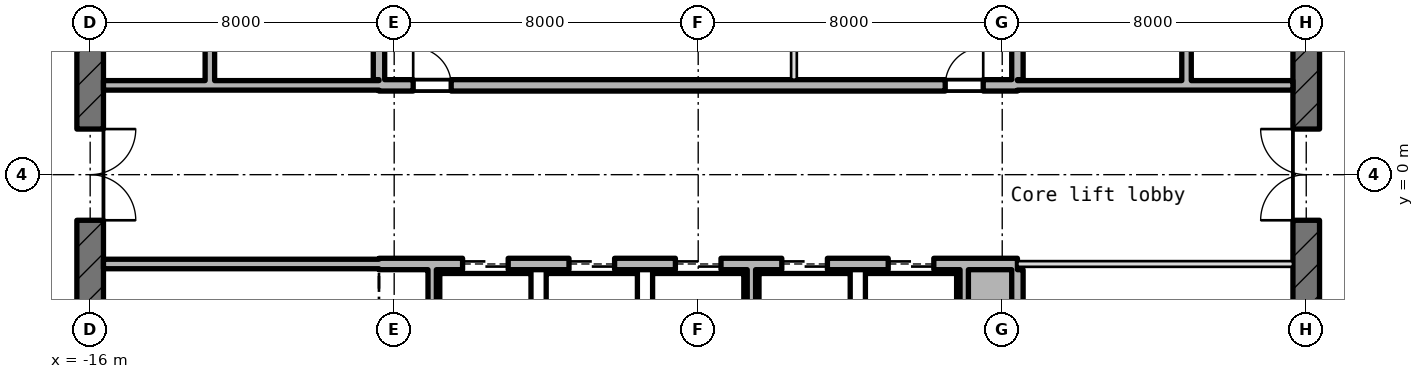
"""IFC4 building model, lengths in metres.
Left out: names, types, materials, properties, quantities, classifications, styles, units other than length and angle.
Written with IfcOpenShell. Run it as: python <this file> out.ifc"""

import sys

from ifc_helpers import new_model, si_unit, direction, frame, frame_2d, origin, place, context, subcontext, project, spatial, rectangle, extrude, element, fill, save


model = new_model("IFC4")
c1 = context("Model", 3, precision=1e-05, world=origin(), true_north=direction((0.0, 1.0)))
c2 = subcontext(c1, "Body", "Model", "MODEL_VIEW")
j1 = project(units=[si_unit("LENGTHUNIT", "METRE"), si_unit("PLANEANGLEUNIT", "RADIAN")], contexts=[c1])
p1 = place(None, origin())
s1 = spatial("IfcSite", under=j1, at=p1, CompositionType="ELEMENT")
p2 = place(p1, origin())
s2 = spatial("IfcBuilding", under=s1, at=p2, CompositionType="ELEMENT")
p3 = place(p2, frame((0.0, 0.0, 384.1)))
s3 = spatial("IfcBuildingStorey", under=s2, at=p3, CompositionType="ELEMENT", Elevation=384.1)
p4 = place(p3, frame((16.0, -10.145, -0.18), z_axis=(0.0, 0.0, 1.0), x_axis=(0.0, 1.0, 0.0)))
e1 = element("IfcWall", 1, at=p4, inside=s3, PredefinedType="SHEAR", context=c2, shape_type="SweptSolid", body=[
    extrude(rectangle(XDim=20.29, YDim=0.7, at=frame_2d((10.145, 0.0))), origin(), (0.0, 0.0, 1.0), 4.15),
])
p5 = place(p4, frame((8.945, 0.0, 0.18)))
e2 = element("IfcOpeningElement", 2, at=p5, cuts=e1, PredefinedType="OPENING", context=c2, shape_type="SweptSolid", body=[
    extrude(rectangle(XDim=2.4, YDim=2.1, at=frame_2d((1.2, 1.05))), frame((0.0, 0.36, 0.0), z_axis=(0.0, -1.0, 0.0), x_axis=(1.0, 0.0, 0.0)), (0.0, 0.0, 1.0), 0.72),
])
p6 = place(p4, frame((13.545, 0.0, 0.18)))
e3 = element("IfcOpeningElement", 3, at=p6, cuts=e1, PredefinedType="OPENING", context=c2, shape_type="SweptSolid", body=[
    extrude(rectangle(XDim=1.2, YDim=2.1, at=frame_2d((0.6, 1.05))), frame((0.0, 0.36, 0.0), z_axis=(0.0, -1.0, 0.0), x_axis=(1.0, 0.0, 0.0)), (0.0, 0.0, 1.0), 0.72),
])
p7 = place(p4, frame((2.4, 0.0, 0.18)))
e4 = element("IfcOpeningElement", 4, at=p7, cuts=e1, PredefinedType="OPENING", context=c2, shape_type="SweptSolid", body=[
    extrude(rectangle(XDim=1.2, YDim=2.1, at=frame_2d((0.6, 1.05))), frame((0.0, 0.36, 0.0), z_axis=(0.0, -1.0, 0.0), x_axis=(1.0, 0.0, 0.0)), (0.0, 0.0, 1.0), 0.72),
])
p8 = place(p3, frame((-16.0, 10.145, -0.18), z_axis=(0.0, 0.0, 1.0), x_axis=(0.0, -1.0, 0.0)))
e5 = element("IfcWall", 5, at=p8, inside=s3, PredefinedType="SHEAR", context=c2, shape_type="SweptSolid", body=[
    extrude(rectangle(XDim=20.29, YDim=0.7, at=frame_2d((10.145, 0.0))), origin(), (0.0, 0.0, 1.0), 4.15),
])
p9 = place(p8, frame((8.945, 0.0, 0.18)))
e6 = element("IfcOpeningElement", 6, at=p9, cuts=e5, PredefinedType="OPENING", context=c2, shape_type="SweptSolid", body=[
    extrude(rectangle(XDim=2.4, YDim=2.1, at=frame_2d((1.2, 1.05))), frame((0.0, 0.36, 0.0), z_axis=(0.0, -1.0, 0.0), x_axis=(1.0, 0.0, 0.0)), (0.0, 0.0, 1.0), 0.72),
])
p10 = place(p8, frame((5.545, 0.0, 0.18)))
e7 = element("IfcOpeningElement", 7, at=p10, cuts=e5, PredefinedType="OPENING", context=c2, shape_type="SweptSolid", body=[
    extrude(rectangle(XDim=1.2, YDim=2.1, at=frame_2d((0.6, 1.05))), frame((0.0, 0.36, 0.0), z_axis=(0.0, -1.0, 0.0), x_axis=(1.0, 0.0, 0.0)), (0.0, 0.0, 1.0), 0.72),
])
p11 = place(p3, frame((-15.65, -2.35, 0.0), z_axis=(0.0, 0.0, 1.0), x_axis=(1.0, 0.0, 0.0)))
e8 = element("IfcWall", 8, at=p11, inside=s3, PredefinedType="STANDARD", context=c2, shape_type="SweptSolid", body=[
    extrude(rectangle(XDim=7.25, YDim=0.25, at=frame_2d((3.625, 0.0))), origin(), (0.0, 0.0, 1.0), 3.97),
])
p12 = place(p3, frame((-8.4, -2.35, -0.18), z_axis=(0.0, 0.0, 1.0), x_axis=(1.0, 0.0, 0.0)))
e9 = element("IfcWall", 9, at=p12, inside=s3, PredefinedType="SHEAR", context=c2, shape_type="SweptSolid", body=[
    extrude(rectangle(XDim=16.8, YDim=0.3, at=frame_2d((8.4, 0.0))), origin(), (0.0, 0.0, 1.0), 4.15),
])
p13 = place(p12, frame((2.2, 0.0, 0.18)))
e10 = element("IfcOpeningElement", 10, at=p13, cuts=e9, PredefinedType="OPENING", context=c2, shape_type="SweptSolid", body=[
    extrude(rectangle(XDim=1.2, YDim=2.1, at=frame_2d((0.6, 1.05))), frame((0.0, 0.16, 0.0), z_axis=(0.0, -1.0, 0.0), x_axis=(1.0, 0.0, 0.0)), (0.0, 0.0, 1.0), 0.32),
])
p14 = place(p12, frame((5.0, 0.0, 0.18)))
e11 = element("IfcOpeningElement", 11, at=p14, cuts=e9, PredefinedType="OPENING", context=c2, shape_type="SweptSolid", body=[
    extrude(rectangle(XDim=1.2, YDim=2.1, at=frame_2d((0.6, 1.05))), frame((0.0, 0.16, 0.0), z_axis=(0.0, -1.0, 0.0), x_axis=(1.0, 0.0, 0.0)), (0.0, 0.0, 1.0), 0.32),
])
p15 = place(p12, frame((7.8, 0.0, 0.18)))
e12 = element("IfcOpeningElement", 12, at=p15, cuts=e9, PredefinedType="OPENING", context=c2, shape_type="SweptSolid", body=[
    extrude(rectangle(XDim=1.2, YDim=2.1, at=frame_2d((0.6, 1.05))), frame((0.0, 0.16, 0.0), z_axis=(0.0, -1.0, 0.0), x_axis=(1.0, 0.0, 0.0)), (0.0, 0.0, 1.0), 0.32),
])
p16 = place(p12, frame((10.6, 0.0, 0.18)))
e13 = element("IfcOpeningElement", 13, at=p16, cuts=e9, PredefinedType="OPENING", context=c2, shape_type="SweptSolid", body=[
    extrude(rectangle(XDim=1.2, YDim=2.1, at=frame_2d((0.6, 1.05))), frame((0.0, 0.16, 0.0), z_axis=(0.0, -1.0, 0.0), x_axis=(1.0, 0.0, 0.0)), (0.0, 0.0, 1.0), 0.32),
])
p17 = place(p12, frame((13.4, 0.0, 0.18)))
e14 = element("IfcOpeningElement", 14, at=p17, cuts=e9, PredefinedType="OPENING", context=c2, shape_type="SweptSolid", body=[
    extrude(rectangle(XDim=1.2, YDim=2.1, at=frame_2d((0.6, 1.05))), frame((0.0, 0.16, 0.0), z_axis=(0.0, -1.0, 0.0), x_axis=(1.0, 0.0, 0.0)), (0.0, 0.0, 1.0), 0.32),
])
p18 = place(p3, frame((8.4, -2.35, 0.0), z_axis=(0.0, 0.0, 1.0), x_axis=(1.0, 0.0, 0.0)))
e15 = element("IfcWall", 15, at=p18, inside=s3, PredefinedType="PARTITIONING", context=c2, shape_type="SweptSolid", body=[
    extrude(rectangle(XDim=7.25, YDim=0.15, at=frame_2d((3.625, 0.0))), origin(), (0.0, 0.0, 1.0), 3.97),
])
p19 = place(p3, frame((-15.65, 2.35, 0.0), z_axis=(0.0, 0.0, 1.0), x_axis=(1.0, 0.0, 0.0)))
e16 = element("IfcWall", 16, at=p19, inside=s3, PredefinedType="STANDARD", context=c2, shape_type="SweptSolid", body=[
    extrude(rectangle(XDim=7.25, YDim=0.25, at=frame_2d((3.625, 0.0))), origin(), (0.0, 0.0, 1.0), 3.97),
])
p20 = place(p3, frame((-8.4, 2.35, -0.18), z_axis=(0.0, 0.0, 1.0), x_axis=(1.0, 0.0, 0.0)))
e17 = element("IfcWall", 17, at=p20, inside=s3, PredefinedType="SHEAR", context=c2, shape_type="SweptSolid", body=[
    extrude(rectangle(XDim=16.8, YDim=0.3, at=frame_2d((8.4, 0.0))), origin(), (0.0, 0.0, 1.0), 4.15),
])
p21 = place(p20, frame((0.9, 0.0, 0.18)))
e18 = element("IfcOpeningElement", 18, at=p21, cuts=e17, PredefinedType="OPENING", context=c2, shape_type="SweptSolid", body=[
    extrude(rectangle(XDim=1.0, YDim=2.1, at=frame_2d((0.5, 1.05))), frame((0.0, 0.16, 0.0), z_axis=(0.0, -1.0, 0.0), x_axis=(1.0, 0.0, 0.0)), (0.0, 0.0, 1.0), 0.32),
])
p22 = place(p20, frame((14.9, 0.0, 0.18)))
e19 = element("IfcOpeningElement", 19, at=p22, cuts=e17, PredefinedType="OPENING", context=c2, shape_type="SweptSolid", body=[
    extrude(rectangle(XDim=1.0, YDim=2.1, at=frame_2d((0.5, 1.05))), frame((0.0, 0.16, 0.0), z_axis=(0.0, -1.0, 0.0), x_axis=(1.0, 0.0, 0.0)), (0.0, 0.0, 1.0), 0.32),
])
p23 = place(p3, frame((8.4, 2.35, 0.0), z_axis=(0.0, 0.0, 1.0), x_axis=(1.0, 0.0, 0.0)))
e20 = element("IfcWall", 20, at=p23, inside=s3, PredefinedType="STANDARD", context=c2, shape_type="SweptSolid", body=[
    extrude(rectangle(XDim=7.25, YDim=0.25, at=frame_2d((3.625, 0.0))), origin(), (0.0, 0.0, 1.0), 3.97),
])
p24 = place(p3, frame((-12.85, 2.475, 0.0), z_axis=(0.0, 0.0, 1.0), x_axis=(0.0, 1.0, 0.0)))
e21 = element("IfcWall", 21, at=p24, inside=s3, PredefinedType="STANDARD", context=c2, shape_type="SweptSolid", body=[
    extrude(rectangle(XDim=3.05, YDim=0.25, at=frame_2d((1.525, 0.0))), origin(), (0.0, 0.0, 1.0), 3.97),
])
p25 = place(p3, frame((-8.4, 2.5, -0.18), z_axis=(0.0, 0.0, 1.0), x_axis=(0.0, 1.0, 0.0)))
e22 = element("IfcWall", 22, at=p25, inside=s3, PredefinedType="SHEAR", context=c2, shape_type="SweptSolid", body=[
    extrude(rectangle(XDim=5.85, YDim=0.3, at=frame_2d((2.925, 0.0))), origin(), (0.0, 0.0, 1.0), 4.15),
])
for number, where, z_axis, x_axis in (
    (23, (-7.0, -5.24, 0.0), (0.0, 0.0, 1.0), (0.0, 1.0, 0.0)),
    (24, (1.4, -5.24, 0.0), (0.0, 0.0, 1.0), (0.0, 1.0, 0.0)),
):
    element("IfcWall", number, at=place(p3, frame(where, z_axis=z_axis, x_axis=x_axis)), inside=s3, PredefinedType="STANDARD", context=c2, shape_type="SweptSolid", body=[
        extrude(rectangle(XDim=2.74, YDim=0.22, at=frame_2d((1.37, 0.0))), origin(), (0.0, 0.0, 1.0), 3.97),
    ])
p26 = place(p3, frame((2.52, 2.5, 0.0), z_axis=(0.0, 0.0, 1.0), x_axis=(0.0, 1.0, 0.0)))
e25 = element("IfcWall", 25, at=p26, inside=s3, PredefinedType="PARTITIONING", context=c2, shape_type="SweptSolid", body=[
    extrude(rectangle(XDim=2.775, YDim=0.15, at=frame_2d((1.387, 0.0))), origin(), (0.0, 0.0, 1.0), 3.97),
])
p27 = place(p3, frame((7.0, -5.24, 0.0), z_axis=(0.0, 0.0, 1.0), x_axis=(0.0, 1.0, 0.0)))
e26 = element("IfcWall", 26, at=p27, inside=s3, PredefinedType="STANDARD", context=c2, shape_type="SweptSolid", body=[
    extrude(rectangle(XDim=2.74, YDim=0.22, at=frame_2d((1.37, 0.0))), origin(), (0.0, 0.0, 1.0), 3.97),
])
for number, where, z_axis, x_axis in (
    (27, (8.4, -8.35, -0.18), (0.0, 0.0, 1.0), (0.0, 1.0, 0.0)),
    (28, (8.4, 2.5, -0.18), (0.0, 0.0, 1.0), (0.0, 1.0, 0.0)),
):
    element("IfcWall", number, at=place(p3, frame(where, z_axis=z_axis, x_axis=x_axis)), inside=s3, PredefinedType="SHEAR", context=c2, shape_type="SweptSolid", body=[
        extrude(rectangle(XDim=5.85, YDim=0.3, at=frame_2d((2.925, 0.0))), origin(), (0.0, 0.0, 1.0), 4.15),
    ])
p28 = place(p3, frame((12.85, 2.475, 0.0), z_axis=(0.0, 0.0, 1.0), x_axis=(0.0, 1.0, 0.0)))
e29 = element("IfcWall", 29, at=p28, inside=s3, PredefinedType="STANDARD", context=c2, shape_type="SweptSolid", body=[
    extrude(rectangle(XDim=3.05, YDim=0.25, at=frame_2d((1.525, 0.0))), origin(), (0.0, 0.0, 1.0), 3.97),
])
p29 = place(p13, origin())
e30 = element("IfcDoor", 30, at=p29, inside=s3, OperationType="DOUBLE_DOOR_SLIDING", PredefinedType="DOOR", context=c2, shape_type="SweptSolid", body=[
    extrude(rectangle(XDim=1.2, YDim=2.1, at=frame_2d((0.6, 1.05))), frame((0.0, 0.025, 0.0), z_axis=(0.0, -1.0, 0.0), x_axis=(1.0, 0.0, 0.0)), (0.0, 0.0, 1.0), 0.05),
])
fill(e10, e30)
p30 = place(p14, origin())
e31 = element("IfcDoor", 31, at=p30, inside=s3, OperationType="DOUBLE_DOOR_SLIDING", PredefinedType="DOOR", context=c2, shape_type="SweptSolid", body=[
    extrude(rectangle(XDim=1.2, YDim=2.1, at=frame_2d((0.6, 1.05))), frame((0.0, 0.025, 0.0), z_axis=(0.0, -1.0, 0.0), x_axis=(1.0, 0.0, 0.0)), (0.0, 0.0, 1.0), 0.05),
])
fill(e11, e31)
p31 = place(p15, origin())
e32 = element("IfcDoor", 32, at=p31, inside=s3, OperationType="DOUBLE_DOOR_SLIDING", PredefinedType="DOOR", context=c2, shape_type="SweptSolid", body=[
    extrude(rectangle(XDim=1.2, YDim=2.1, at=frame_2d((0.6, 1.05))), frame((0.0, 0.025, 0.0), z_axis=(0.0, -1.0, 0.0), x_axis=(1.0, 0.0, 0.0)), (0.0, 0.0, 1.0), 0.05),
])
fill(e12, e32)
p32 = place(p16, origin())
e33 = element("IfcDoor", 33, at=p32, inside=s3, OperationType="DOUBLE_DOOR_SLIDING", PredefinedType="DOOR", context=c2, shape_type="SweptSolid", body=[
    extrude(rectangle(XDim=1.2, YDim=2.1, at=frame_2d((0.6, 1.05))), frame((0.0, 0.025, 0.0), z_axis=(0.0, -1.0, 0.0), x_axis=(1.0, 0.0, 0.0)), (0.0, 0.0, 1.0), 0.05),
])
fill(e13, e33)
p33 = place(p17, origin())
e34 = element("IfcDoor", 34, at=p33, inside=s3, OperationType="DOUBLE_DOOR_SLIDING", PredefinedType="DOOR", context=c2, shape_type="SweptSolid", body=[
    extrude(rectangle(XDim=1.2, YDim=2.1, at=frame_2d((0.6, 1.05))), frame((0.0, 0.025, 0.0), z_axis=(0.0, -1.0, 0.0), x_axis=(1.0, 0.0, 0.0)), (0.0, 0.0, 1.0), 0.05),
])
fill(e14, e34)
p34 = place(p9, origin())
e35 = element("IfcDoor", 35, at=p34, inside=s3, OperationType="DOUBLE_DOOR_SINGLE_SWING", PredefinedType="DOOR", context=c2, shape_type="SweptSolid", body=[
    extrude(rectangle(XDim=2.4, YDim=2.1, at=frame_2d((1.2, 1.05))), frame((0.0, 0.025, 0.0), z_axis=(0.0, -1.0, 0.0), x_axis=(1.0, 0.0, 0.0)), (0.0, 0.0, 1.0), 0.05),
])
fill(e6, e35)
p35 = place(p5, origin())
e36 = element("IfcDoor", 36, at=p35, inside=s3, OperationType="DOUBLE_DOOR_SINGLE_SWING", PredefinedType="DOOR", context=c2, shape_type="SweptSolid", body=[
    extrude(rectangle(XDim=2.4, YDim=2.1, at=frame_2d((1.2, 1.05))), frame((0.0, 0.025, 0.0), z_axis=(0.0, -1.0, 0.0), x_axis=(1.0, 0.0, 0.0)), (0.0, 0.0, 1.0), 0.05),
])
fill(e2, e36)
p36 = place(p21, origin())
e37 = element("IfcDoor", 37, at=p36, inside=s3, OperationType="SINGLE_SWING_RIGHT", PredefinedType="DOOR", context=c2, shape_type="SweptSolid", body=[
    extrude(rectangle(XDim=1.0, YDim=2.1, at=frame_2d((0.5, 1.05))), frame((0.0, 0.025, 0.0), z_axis=(0.0, -1.0, 0.0), x_axis=(1.0, 0.0, 0.0)), (0.0, 0.0, 1.0), 0.05),
])
fill(e18, e37)
p37 = place(p22, origin())
e38 = element("IfcDoor", 38, at=p37, inside=s3, OperationType="SINGLE_SWING_RIGHT", PredefinedType="DOOR", context=c2, shape_type="SweptSolid", body=[
    extrude(rectangle(XDim=1.0, YDim=2.1, at=frame_2d((0.5, 1.05))), frame((0.0, 0.025, 0.0), z_axis=(0.0, -1.0, 0.0), x_axis=(1.0, 0.0, 0.0)), (0.0, 0.0, 1.0), 0.05),
])
fill(e19, e38)
save(model, sys.argv[1])
